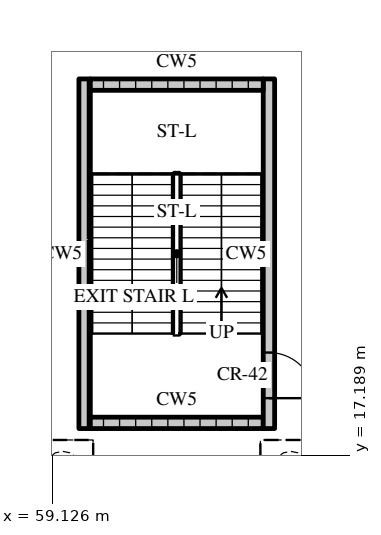
"""IFC4 building model, lengths in metres.
Left out: names, types, materials, properties, quantities, classifications, styles, units other than length and angle.
Written with IfcOpenShell. Run it as: python <this file> out.ifc"""

import sys

from ifc_helpers import new_model, si_unit, direction, frame, frame_2d, origin, place, context, subcontext, project, spatial, rectangle, extrude, element, fill, save


model = new_model("IFC4")
c1 = context("Model", 3, precision=1e-05, world=origin(), true_north=direction((0.0, 1.0)))
c2 = subcontext(c1, "Body", "Model", "MODEL_VIEW")
j1 = project(units=[si_unit("LENGTHUNIT", "METRE"), si_unit("PLANEANGLEUNIT", "RADIAN")], contexts=[c1])
p1 = place(None, origin())
s1 = spatial("IfcSite", under=j1, at=p1, CompositionType="ELEMENT")
p2 = place(p1, origin())
s2 = spatial("IfcBuilding", under=s1, at=p2, CompositionType="ELEMENT")
p3 = place(p2, frame((0.0, 0.0, -6.0)))
s3 = spatial("IfcBuildingStorey", under=s2, at=p3, CompositionType="ELEMENT", Elevation=-6.0)
p4 = place(p3, frame((59.975, 17.9, 0.0), z_axis=(0.0, 0.0, 1.0), x_axis=(0.0, 1.0, 0.0)))
e1 = element("IfcWall", 1, at=p4, inside=s3, PredefinedType="SOLIDWALL", context=c2, shape_type="SweptSolid", body=[
    extrude(rectangle(XDim=9.2, YDim=0.3, at=frame_2d((4.6, 0.0))), origin(), (0.0, 0.0, 1.0), 5.7),
])
p5 = place(p3, frame((60.125, 18.05, 0.0), z_axis=(0.0, 0.0, 1.0), x_axis=(1.0, 0.0, 0.0)))
e2 = element("IfcWall", 2, at=p5, inside=s3, PredefinedType="SOLIDWALL", context=c2, shape_type="SweptSolid", body=[
    extrude(rectangle(XDim=4.55, YDim=0.3, at=frame_2d((2.275, 0.0))), origin(), (0.0, 0.0, 1.0), 5.7),
])
p6 = place(p3, frame((64.825, 17.9, 0.0), z_axis=(0.0, 0.0, 1.0), x_axis=(0.0, 1.0, 0.0)))
e3 = element("IfcWall", 3, at=p6, inside=s3, PredefinedType="SOLIDWALL", context=c2, shape_type="SweptSolid", body=[
    extrude(rectangle(XDim=9.2, YDim=0.3, at=frame_2d((4.6, 0.0))), origin(), (0.0, 0.0, 1.0), 5.7),
])
p7 = place(p6, frame((0.8, 0.0, 0.0)))
e4 = element("IfcOpeningElement", 4, at=p7, cuts=e3, PredefinedType="OPENING", context=c2, shape_type="SweptSolid", body=[
    extrude(rectangle(XDim=1.2, YDim=2.1, at=frame_2d((0.6, 1.05))), frame((0.0, 0.16, 0.0), z_axis=(0.0, -1.0, 0.0), x_axis=(1.0, 0.0, 0.0)), (0.0, 0.0, 1.0), 0.32),
])
p8 = place(p3, frame((60.125, 26.95, 0.0), z_axis=(0.0, 0.0, 1.0), x_axis=(1.0, 0.0, 0.0)))
e5 = element("IfcWall", 5, at=p8, inside=s3, PredefinedType="SOLIDWALL", context=c2, shape_type="SweptSolid", body=[
    extrude(rectangle(XDim=4.55, YDim=0.3, at=frame_2d((2.275, 0.0))), origin(), (0.0, 0.0, 1.0), 5.7),
])
p9 = place(p7, origin())
e6 = element("IfcDoor", 6, at=p9, inside=s3, OperationType="SINGLE_SWING_RIGHT", PredefinedType="DOOR", context=c2, shape_type="SweptSolid", body=[
    extrude(rectangle(XDim=1.2, YDim=2.1, at=frame_2d((0.6, 1.05))), frame((0.0, 0.025, 0.0), z_axis=(0.0, -1.0, 0.0), x_axis=(1.0, 0.0, 0.0)), (0.0, 0.0, 1.0), 0.05),
])
fill(e4, e6)
save(model, sys.argv[1])
